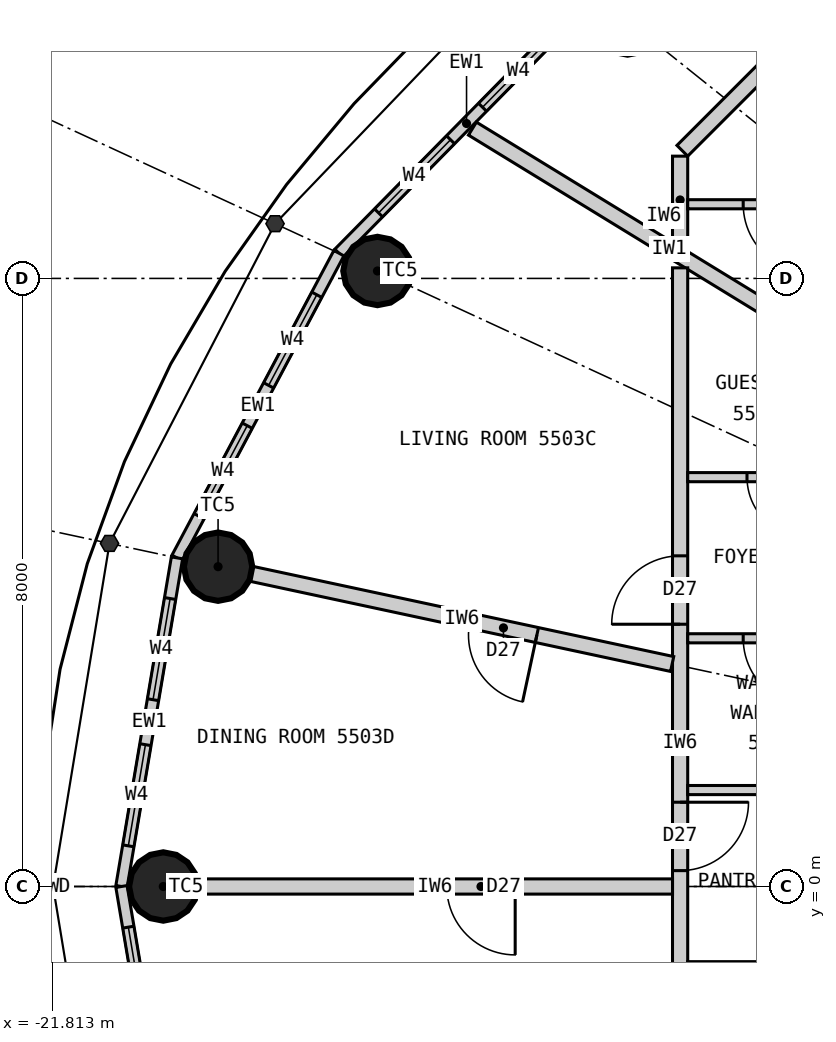
"""IFC4 building model, lengths in metres.
Left out: names, types, materials, properties, quantities, classifications, styles, units other than length and angle.
Written with IfcOpenShell. Run it as: python <this file> out.ifc"""

import sys

from ifc_helpers import new_model, si_unit, direction, frame, frame_2d, origin, origin_2d, place, context, subcontext, project, spatial, rectangle, circle, extrude, element, fill, save


model = new_model("IFC4")
c1 = context("Model", 3, precision=1e-05, world=origin(), true_north=direction((0.0, 1.0)))
c2 = subcontext(c1, "Body", "Model", "MODEL_VIEW")
j1 = project(units=[si_unit("LENGTHUNIT", "METRE"), si_unit("PLANEANGLEUNIT", "RADIAN")], contexts=[c1])
p1 = place(None, origin())
s1 = spatial("IfcSite", under=j1, at=p1, CompositionType="ELEMENT")
p2 = place(p1, origin())
s2 = spatial("IfcBuilding", under=s1, at=p2, CompositionType="ELEMENT")
p3 = place(p2, frame((0.0, 0.0, 206.1)))
s3 = spatial("IfcBuildingStorey", under=s2, at=p3, CompositionType="ELEMENT", Elevation=206.1)
for number, where, z_axis, x_axis in (
    (1, (-14.241, 11.393, 0.0), (0.0, 0.0, 1.0), (1.0, 0.0, 0.0)),
    (2, (-17.532, 8.098, 0.0), (0.0, 0.0, 1.0), (1.0, 0.0, 0.0)),
    (3, (-19.629, 4.208, 0.0), (0.0, 0.0, 1.0), (1.0, 0.0, 0.0)),
    (4, (-20.35, 0.0, 0.0), (0.0, 0.0, 1.0), (1.0, 0.0, 0.0)),
):
    element("IfcColumn", number, at=place(p3, frame(where, z_axis=z_axis, x_axis=x_axis)), inside=s3, PredefinedType="COLUMN", context=c2, shape_type="SweptSolid", body=[
        extrude(circle(Radius=0.45, at=origin_2d()), origin(), (0.0, 0.0, 1.0), 3.3),
    ])
p4 = place(p3, frame((-14.68, 11.744, 0.0), z_axis=(0.0, 0.0, 1.0), x_axis=(-0.701527379618, -0.712642501993, 0.0)))
e5 = element("IfcWall", 5, at=p4, inside=s3, PredefinedType="ELEMENTEDWALL", context=c2, shape_type="SweptSolid", body=[
    extrude(rectangle(XDim=4.788, YDim=0.15, at=frame_2d((2.394, 0.0))), origin(), (0.0, 0.0, 1.0), 3.12),
])
p5 = place(p4, frame((0.744, 0.0, 0.9)))
e6 = element("IfcOpeningElement", 6, at=p5, cuts=e5, PredefinedType="OPENING", context=c2, shape_type="SweptSolid", body=[
    extrude(rectangle(XDim=1.35, YDim=1.9, at=frame_2d((0.675, 0.95))), frame((0.0, 0.085, 0.0), z_axis=(0.0, -1.0, 0.0), x_axis=(1.0, 0.0, 0.0)), (0.0, 0.0, 1.0), 0.17),
])
p6 = place(p4, frame((2.694, 0.0, 0.9)))
e7 = element("IfcOpeningElement", 7, at=p6, cuts=e5, PredefinedType="OPENING", context=c2, shape_type="SweptSolid", body=[
    extrude(rectangle(XDim=1.35, YDim=1.9, at=frame_2d((0.675, 0.95))), frame((0.0, 0.085, 0.0), z_axis=(0.0, -1.0, 0.0), x_axis=(1.0, 0.0, 0.0)), (0.0, 0.0, 1.0), 0.17),
])
p7 = place(p3, frame((-18.04, 8.332, 0.0), z_axis=(0.0, 0.0, 1.0), x_axis=(-0.469256152955, -0.883062094597, 0.0)))
e8 = element("IfcWall", 8, at=p7, inside=s3, PredefinedType="ELEMENTEDWALL", context=c2, shape_type="SweptSolid", body=[
    extrude(rectangle(XDim=4.539, YDim=0.15, at=frame_2d((2.27, 0.0))), origin(), (0.0, 0.0, 1.0), 3.12),
])
p8 = place(p7, frame((0.62, 0.0, 0.9)))
e9 = element("IfcOpeningElement", 9, at=p8, cuts=e8, PredefinedType="OPENING", context=c2, shape_type="SweptSolid", body=[
    extrude(rectangle(XDim=1.35, YDim=1.9, at=frame_2d((0.675, 0.95))), frame((0.0, 0.085, 0.0), z_axis=(0.0, -1.0, 0.0), x_axis=(1.0, 0.0, 0.0)), (0.0, 0.0, 1.0), 0.17),
])
p9 = place(p7, frame((2.57, 0.0, 0.9)))
e10 = element("IfcOpeningElement", 10, at=p9, cuts=e8, PredefinedType="OPENING", context=c2, shape_type="SweptSolid", body=[
    extrude(rectangle(XDim=1.35, YDim=1.9, at=frame_2d((0.675, 0.95))), frame((0.0, 0.085, 0.0), z_axis=(0.0, -1.0, 0.0), x_axis=(1.0, 0.0, 0.0)), (0.0, 0.0, 1.0), 0.17),
])
p10 = place(p3, frame((-20.17, 4.323, 0.0), z_axis=(0.0, 0.0, 1.0), x_axis=(-0.166538513568, -0.986034950445, 0.0)))
e11 = element("IfcWall", 11, at=p10, inside=s3, PredefinedType="ELEMENTEDWALL", context=c2, shape_type="SweptSolid", body=[
    extrude(rectangle(XDim=4.385, YDim=0.15, at=frame_2d((2.192, 0.0))), origin(), (0.0, 0.0, 1.0), 3.12),
])
p11 = place(p10, frame((0.542, 0.0, 0.9)))
e12 = element("IfcOpeningElement", 12, at=p11, cuts=e11, PredefinedType="OPENING", context=c2, shape_type="SweptSolid", body=[
    extrude(rectangle(XDim=1.35, YDim=1.9, at=frame_2d((0.675, 0.95))), frame((0.0, 0.085, 0.0), z_axis=(0.0, -1.0, 0.0), x_axis=(1.0, 0.0, 0.0)), (0.0, 0.0, 1.0), 0.17),
])
p12 = place(p10, frame((2.492, 0.0, 0.9)))
e13 = element("IfcOpeningElement", 13, at=p12, cuts=e11, PredefinedType="OPENING", context=c2, shape_type="SweptSolid", body=[
    extrude(rectangle(XDim=1.35, YDim=1.9, at=frame_2d((0.675, 0.95))), frame((0.0, 0.085, 0.0), z_axis=(0.0, -1.0, 0.0), x_axis=(1.0, 0.0, 0.0)), (0.0, 0.0, 1.0), 0.17),
])
p13 = place(p3, frame((-20.9, 0.0, 0.0), z_axis=(0.0, 0.0, 1.0), x_axis=(0.166538513568, -0.986034950445, 0.0)))
e14 = element("IfcWall", 14, at=p13, inside=s3, PredefinedType="ELEMENTEDWALL", context=c2, shape_type="SweptSolid", body=[
    extrude(rectangle(XDim=4.385, YDim=0.15, at=frame_2d((2.192, 0.0))), origin(), (0.0, 0.0, 1.0), 3.12),
])
p14 = place(p13, frame((0.542, 0.0, 0.9)))
e15 = element("IfcOpeningElement", 15, at=p14, cuts=e14, PredefinedType="OPENING", context=c2, shape_type="SweptSolid", body=[
    extrude(rectangle(XDim=1.35, YDim=1.9, at=frame_2d((0.675, 0.95))), frame((0.0, 0.085, 0.0), z_axis=(0.0, -1.0, 0.0), x_axis=(1.0, 0.0, 0.0)), (0.0, 0.0, 1.0), 0.17),
])
p15 = place(p13, frame((2.492, 0.0, 0.9)))
e16 = element("IfcOpeningElement", 16, at=p15, cuts=e14, PredefinedType="OPENING", context=c2, shape_type="SweptSolid", body=[
    extrude(rectangle(XDim=1.35, YDim=1.9, at=frame_2d((0.675, 0.95))), frame((0.0, 0.085, 0.0), z_axis=(0.0, -1.0, 0.0), x_axis=(1.0, 0.0, 0.0)), (0.0, 0.0, 1.0), 0.17),
])
p16 = place(p3, frame((-11.1, 6.797, 0.0), z_axis=(0.0, 0.0, 1.0), x_axis=(-0.852799818179, 0.522237943963, 0.0)))
e17 = element("IfcWall", 17, at=p16, inside=s3, PredefinedType="PARTITIONING", context=c2, shape_type="SweptSolid", body=[
    extrude(rectangle(XDim=6.077, YDim=0.2, at=frame_2d((3.039, 0.0))), origin(), (0.0, 0.0, 1.0), 3.12),
])
p17 = place(p3, frame((-10.679, 12.521, 0.0), z_axis=(0.0, 0.0, 1.0), x_axis=(-0.707106781187, -0.707106781187, 0.0)))
e18 = element("IfcWall", 18, at=p17, inside=s3, PredefinedType="PARTITIONING", context=c2, shape_type="SweptSolid", body=[
    extrude(rectangle(XDim=4.019, YDim=0.2, at=frame_2d((2.009, 0.0))), origin(), (0.0, 0.0, 1.0), 3.12),
])
p18 = place(p3, frame((-13.55, 9.609, 0.0), z_axis=(0.0, 0.0, 1.0), x_axis=(0.0, -1.0, 0.0)))
e19 = element("IfcWall", 19, at=p18, inside=s3, PredefinedType="PARTITIONING", context=c2, shape_type="SweptSolid", body=[
    extrude(rectangle(XDim=1.153, YDim=0.2, at=frame_2d((0.576, 0.0))), origin(), (0.0, 0.0, 1.0), 3.12),
])
p19 = place(p3, frame((-11.1, 8.976, 0.0), z_axis=(0.0, 0.0, 1.0), x_axis=(-1.0, 0.0, 0.0)))
e20 = element("IfcWall", 20, at=p19, inside=s3, PredefinedType="PARTITIONING", context=c2, shape_type="SweptSolid", body=[
    extrude(rectangle(XDim=2.35, YDim=0.12, at=frame_2d((1.175, 0.0))), origin(), (0.0, 0.0, 1.0), 3.12),
])
p20 = place(p19, frame((0.72, 0.0, 0.0)))
e21 = element("IfcOpeningElement", 21, at=p20, cuts=e20, PredefinedType="OPENING", context=c2, shape_type="SweptSolid", body=[
    extrude(rectangle(XDim=0.9, YDim=2.1, at=frame_2d((0.45, 1.05))), frame((0.0, 0.07, 0.0), z_axis=(0.0, -1.0, 0.0), x_axis=(1.0, 0.0, 0.0)), (0.0, 0.0, 1.0), 0.14),
])
p21 = place(p3, frame((-13.55, 8.139, 0.0), z_axis=(0.0, 0.0, 1.0), x_axis=(0.0, -1.0, 0.0)))
e22 = element("IfcWall", 22, at=p21, inside=s3, PredefinedType="PARTITIONING", context=c2, shape_type="SweptSolid", body=[
    extrude(rectangle(XDim=12.496, YDim=0.2, at=frame_2d((6.248, 0.0))), origin(), (0.0, 0.0, 1.0), 3.12),
])
p22 = place(p21, frame((7.031, 0.0, 0.0)))
e23 = element("IfcOpeningElement", 23, at=p22, cuts=e22, PredefinedType="OPENING", context=c2, shape_type="SweptSolid", body=[
    extrude(rectangle(XDim=0.9, YDim=2.1, at=frame_2d((0.45, 1.05))), frame((0.0, 0.11, 0.0), z_axis=(0.0, -1.0, 0.0), x_axis=(1.0, 0.0, 0.0)), (0.0, 0.0, 1.0), 0.22),
])
p23 = place(p21, frame((9.373, 0.0, 0.0)))
e24 = element("IfcOpeningElement", 24, at=p23, cuts=e22, PredefinedType="OPENING", context=c2, shape_type="SweptSolid", body=[
    extrude(rectangle(XDim=0.8, YDim=2.1, at=frame_2d((0.4, 1.05))), frame((0.0, 0.11, 0.0), z_axis=(0.0, -1.0, 0.0), x_axis=(1.0, 0.0, 0.0)), (0.0, 0.0, 1.0), 0.22),
])
p24 = place(p21, frame((3.789, 0.0, 0.0)))
e25 = element("IfcOpeningElement", 25, at=p24, cuts=e22, PredefinedType="OPENING", context=c2, shape_type="SweptSolid", body=[
    extrude(rectangle(XDim=0.9, YDim=2.1, at=frame_2d((0.45, 1.05))), frame((0.0, 0.11, 0.0), z_axis=(0.0, -1.0, 0.0), x_axis=(1.0, 0.0, 0.0)), (0.0, 0.0, 1.0), 0.22),
])
p25 = place(p3, frame((-13.655, 2.927, 0.0), z_axis=(0.0, 0.0, 1.0), x_axis=(-0.977790419294, 0.209585056568, 0.0)))
e26 = element("IfcWall", 26, at=p25, inside=s3, PredefinedType="PARTITIONING", context=c2, shape_type="SweptSolid", body=[
    extrude(rectangle(XDim=5.66, YDim=0.2, at=frame_2d((2.83, 0.0))), origin(), (0.0, 0.0, 1.0), 2.42),
])
p26 = place(p25, frame((1.82, 0.0, 0.0)))
e27 = element("IfcOpeningElement", 27, at=p26, cuts=e26, PredefinedType="OPENING", context=c2, shape_type="SweptSolid", body=[
    extrude(rectangle(XDim=0.9, YDim=2.1, at=frame_2d((0.45, 1.05))), frame((0.0, 0.11, 0.0), z_axis=(0.0, -1.0, 0.0), x_axis=(1.0, 0.0, 0.0)), (0.0, 0.0, 1.0), 0.22),
])
p27 = place(p3, frame((-13.65, 0.0, 0.0), z_axis=(0.0, 0.0, 1.0), x_axis=(-1.0, 0.0, 0.0)))
e28 = element("IfcWall", 28, at=p27, inside=s3, PredefinedType="PARTITIONING", context=c2, shape_type="SweptSolid", body=[
    extrude(rectangle(XDim=6.25, YDim=0.2, at=frame_2d((3.125, 0.0))), origin(), (0.0, 0.0, 1.0), 2.37),
])
p28 = place(p27, frame((2.07, 0.0, 0.0)))
e29 = element("IfcOpeningElement", 29, at=p28, cuts=e28, PredefinedType="OPENING", context=c2, shape_type="SweptSolid", body=[
    extrude(rectangle(XDim=0.9, YDim=2.1, at=frame_2d((0.45, 1.05))), frame((0.0, 0.11, 0.0), z_axis=(0.0, -1.0, 0.0), x_axis=(1.0, 0.0, 0.0)), (0.0, 0.0, 1.0), 0.22),
])
p29 = place(p3, frame((-11.1, 5.385, 0.0), z_axis=(0.0, 0.0, 1.0), x_axis=(-1.0, 0.0, 0.0)))
e30 = element("IfcWall", 30, at=p29, inside=s3, PredefinedType="PARTITIONING", context=c2, shape_type="SweptSolid", body=[
    extrude(rectangle(XDim=2.35, YDim=0.12, at=frame_2d((1.175, 0.0))), origin(), (0.0, 0.0, 1.0), 3.12),
])
p30 = place(p29, frame((0.77, 0.0, 0.0)))
e31 = element("IfcOpeningElement", 31, at=p30, cuts=e30, PredefinedType="OPENING", context=c2, shape_type="SweptSolid", body=[
    extrude(rectangle(XDim=0.8, YDim=2.1, at=frame_2d((0.4, 1.05))), frame((0.0, 0.07, 0.0), z_axis=(0.0, -1.0, 0.0), x_axis=(1.0, 0.0, 0.0)), (0.0, 0.0, 1.0), 0.14),
])
p31 = place(p3, frame((-11.1, 3.265, 0.0), z_axis=(0.0, 0.0, 1.0), x_axis=(-1.0, 0.0, 0.0)))
e32 = element("IfcWall", 32, at=p31, inside=s3, PredefinedType="PARTITIONING", context=c2, shape_type="SweptSolid", body=[
    extrude(rectangle(XDim=2.35, YDim=0.12, at=frame_2d((1.175, 0.0))), origin(), (0.0, 0.0, 1.0), 2.42),
])
p32 = place(p31, frame((0.72, 0.0, 0.0)))
e33 = element("IfcOpeningElement", 33, at=p32, cuts=e32, PredefinedType="OPENING", context=c2, shape_type="SweptSolid", body=[
    extrude(rectangle(XDim=0.9, YDim=2.1, at=frame_2d((0.45, 1.05))), frame((0.0, 0.07, 0.0), z_axis=(0.0, -1.0, 0.0), x_axis=(1.0, 0.0, 0.0)), (0.0, 0.0, 1.0), 0.14),
])
for number, where, z_axis, x_axis in (
    (34, (-11.1, 1.269, 0.0), (0.0, 0.0, 1.0), (-1.0, 0.0, 0.0)),
    (35, (-11.1, -1.049, 0.0), (0.0, 0.0, 1.0), (-1.0, 0.0, 0.0)),
):
    element("IfcWall", number, at=place(p3, frame(where, z_axis=z_axis, x_axis=x_axis)), inside=s3, PredefinedType="PARTITIONING", context=c2, shape_type="SweptSolid", body=[
        extrude(rectangle(XDim=2.35, YDim=0.12, at=frame_2d((1.175, 0.0))), origin(), (0.0, 0.0, 1.0), 3.12),
    ])
p33 = place(p5, origin())
e36 = element("IfcWindow", 36, at=p33, inside=s3, PartitioningType="SINGLE_PANEL", PredefinedType="WINDOW", context=c2, shape_type="SweptSolid", body=[
    extrude(rectangle(XDim=1.35, YDim=1.9, at=frame_2d((0.675, 0.95))), frame((0.0, 0.03, 0.0), z_axis=(0.0, -1.0, 0.0), x_axis=(1.0, 0.0, 0.0)), (0.0, 0.0, 1.0), 0.06),
])
fill(e6, e36)
p34 = place(p6, origin())
e37 = element("IfcWindow", 37, at=p34, inside=s3, PartitioningType="SINGLE_PANEL", PredefinedType="WINDOW", context=c2, shape_type="SweptSolid", body=[
    extrude(rectangle(XDim=1.35, YDim=1.9, at=frame_2d((0.675, 0.95))), frame((0.0, 0.03, 0.0), z_axis=(0.0, -1.0, 0.0), x_axis=(1.0, 0.0, 0.0)), (0.0, 0.0, 1.0), 0.06),
])
fill(e7, e37)
p35 = place(p8, origin())
e38 = element("IfcWindow", 38, at=p35, inside=s3, PartitioningType="SINGLE_PANEL", PredefinedType="WINDOW", context=c2, shape_type="SweptSolid", body=[
    extrude(rectangle(XDim=1.35, YDim=1.9, at=frame_2d((0.675, 0.95))), frame((0.0, 0.03, 0.0), z_axis=(0.0, -1.0, 0.0), x_axis=(1.0, 0.0, 0.0)), (0.0, 0.0, 1.0), 0.06),
])
fill(e9, e38)
p36 = place(p9, origin())
e39 = element("IfcWindow", 39, at=p36, inside=s3, PartitioningType="SINGLE_PANEL", PredefinedType="WINDOW", context=c2, shape_type="SweptSolid", body=[
    extrude(rectangle(XDim=1.35, YDim=1.9, at=frame_2d((0.675, 0.95))), frame((0.0, 0.03, 0.0), z_axis=(0.0, -1.0, 0.0), x_axis=(1.0, 0.0, 0.0)), (0.0, 0.0, 1.0), 0.06),
])
fill(e10, e39)
p37 = place(p11, origin())
e40 = element("IfcWindow", 40, at=p37, inside=s3, PartitioningType="SINGLE_PANEL", PredefinedType="WINDOW", context=c2, shape_type="SweptSolid", body=[
    extrude(rectangle(XDim=1.35, YDim=1.9, at=frame_2d((0.675, 0.95))), frame((0.0, 0.03, 0.0), z_axis=(0.0, -1.0, 0.0), x_axis=(1.0, 0.0, 0.0)), (0.0, 0.0, 1.0), 0.06),
])
fill(e12, e40)
p38 = place(p12, origin())
e41 = element("IfcWindow", 41, at=p38, inside=s3, PartitioningType="SINGLE_PANEL", PredefinedType="WINDOW", context=c2, shape_type="SweptSolid", body=[
    extrude(rectangle(XDim=1.35, YDim=1.9, at=frame_2d((0.675, 0.95))), frame((0.0, 0.03, 0.0), z_axis=(0.0, -1.0, 0.0), x_axis=(1.0, 0.0, 0.0)), (0.0, 0.0, 1.0), 0.06),
])
fill(e13, e41)
p39 = place(p14, origin())
e42 = element("IfcWindow", 42, at=p39, inside=s3, PartitioningType="SINGLE_PANEL", PredefinedType="WINDOW", context=c2, shape_type="SweptSolid", body=[
    extrude(rectangle(XDim=1.35, YDim=1.9, at=frame_2d((0.675, 0.95))), frame((0.0, 0.03, 0.0), z_axis=(0.0, -1.0, 0.0), x_axis=(1.0, 0.0, 0.0)), (0.0, 0.0, 1.0), 0.06),
])
fill(e15, e42)
p40 = place(p20, origin())
e43 = element("IfcDoor", 43, at=p40, inside=s3, OperationType="SINGLE_SWING_LEFT", PredefinedType="DOOR", context=c2, shape_type="SweptSolid", body=[
    extrude(rectangle(XDim=0.9, YDim=2.1, at=frame_2d((0.45, 1.05))), frame((0.0, 0.025, 0.0), z_axis=(0.0, -1.0, 0.0), x_axis=(1.0, 0.0, 0.0)), (0.0, 0.0, 1.0), 0.05),
])
fill(e21, e43)
p41 = place(p30, origin())
e44 = element("IfcDoor", 44, at=p41, inside=s3, OperationType="SINGLE_SWING_LEFT", PredefinedType="DOOR", context=c2, shape_type="SweptSolid", body=[
    extrude(rectangle(XDim=0.8, YDim=2.1, at=frame_2d((0.4, 1.05))), frame((0.0, 0.025, 0.0), z_axis=(0.0, -1.0, 0.0), x_axis=(1.0, 0.0, 0.0)), (0.0, 0.0, 1.0), 0.05),
])
fill(e31, e44)
p42 = place(p32, origin())
e45 = element("IfcDoor", 45, at=p42, inside=s3, OperationType="SINGLE_SWING_LEFT", PredefinedType="DOOR", context=c2, shape_type="SweptSolid", body=[
    extrude(rectangle(XDim=0.9, YDim=2.1, at=frame_2d((0.45, 1.05))), frame((0.0, 0.025, 0.0), z_axis=(0.0, -1.0, 0.0), x_axis=(1.0, 0.0, 0.0)), (0.0, 0.0, 1.0), 0.05),
])
fill(e33, e45)
p43 = place(p22, origin())
e46 = element("IfcDoor", 46, at=p43, inside=s3, OperationType="SINGLE_SWING_LEFT", PredefinedType="DOOR", context=c2, shape_type="SweptSolid", body=[
    extrude(rectangle(XDim=0.9, YDim=2.1, at=frame_2d((0.45, 1.05))), frame((0.0, 0.025, 0.0), z_axis=(0.0, -1.0, 0.0), x_axis=(1.0, 0.0, 0.0)), (0.0, 0.0, 1.0), 0.05),
])
fill(e23, e46)
p44 = place(p24, origin())
e47 = element("IfcDoor", 47, at=p44, inside=s3, OperationType="SINGLE_SWING_RIGHT", PredefinedType="DOOR", context=c2, shape_type="SweptSolid", body=[
    extrude(rectangle(XDim=0.9, YDim=2.1, at=frame_2d((0.45, 1.05))), frame((0.0, 0.025, 0.0), z_axis=(0.0, -1.0, 0.0), x_axis=(1.0, 0.0, 0.0)), (0.0, 0.0, 1.0), 0.05),
])
fill(e25, e47)
p45 = place(p26, origin())
e48 = element("IfcDoor", 48, at=p45, inside=s3, OperationType="SINGLE_SWING_LEFT", PredefinedType="DOOR", context=c2, shape_type="SweptSolid", body=[
    extrude(rectangle(XDim=0.9, YDim=2.1, at=frame_2d((0.45, 1.05))), frame((0.0, 0.025, 0.0), z_axis=(0.0, -1.0, 0.0), x_axis=(1.0, 0.0, 0.0)), (0.0, 0.0, 1.0), 0.05),
])
fill(e27, e48)
p46 = place(p28, origin())
e49 = element("IfcDoor", 49, at=p46, inside=s3, OperationType="SINGLE_SWING_LEFT", PredefinedType="DOOR", context=c2, shape_type="SweptSolid", body=[
    extrude(rectangle(XDim=0.9, YDim=2.1, at=frame_2d((0.45, 1.05))), frame((0.0, 0.025, 0.0), z_axis=(0.0, -1.0, 0.0), x_axis=(1.0, 0.0, 0.0)), (0.0, 0.0, 1.0), 0.05),
])
fill(e29, e49)
save(model, sys.argv[1])
